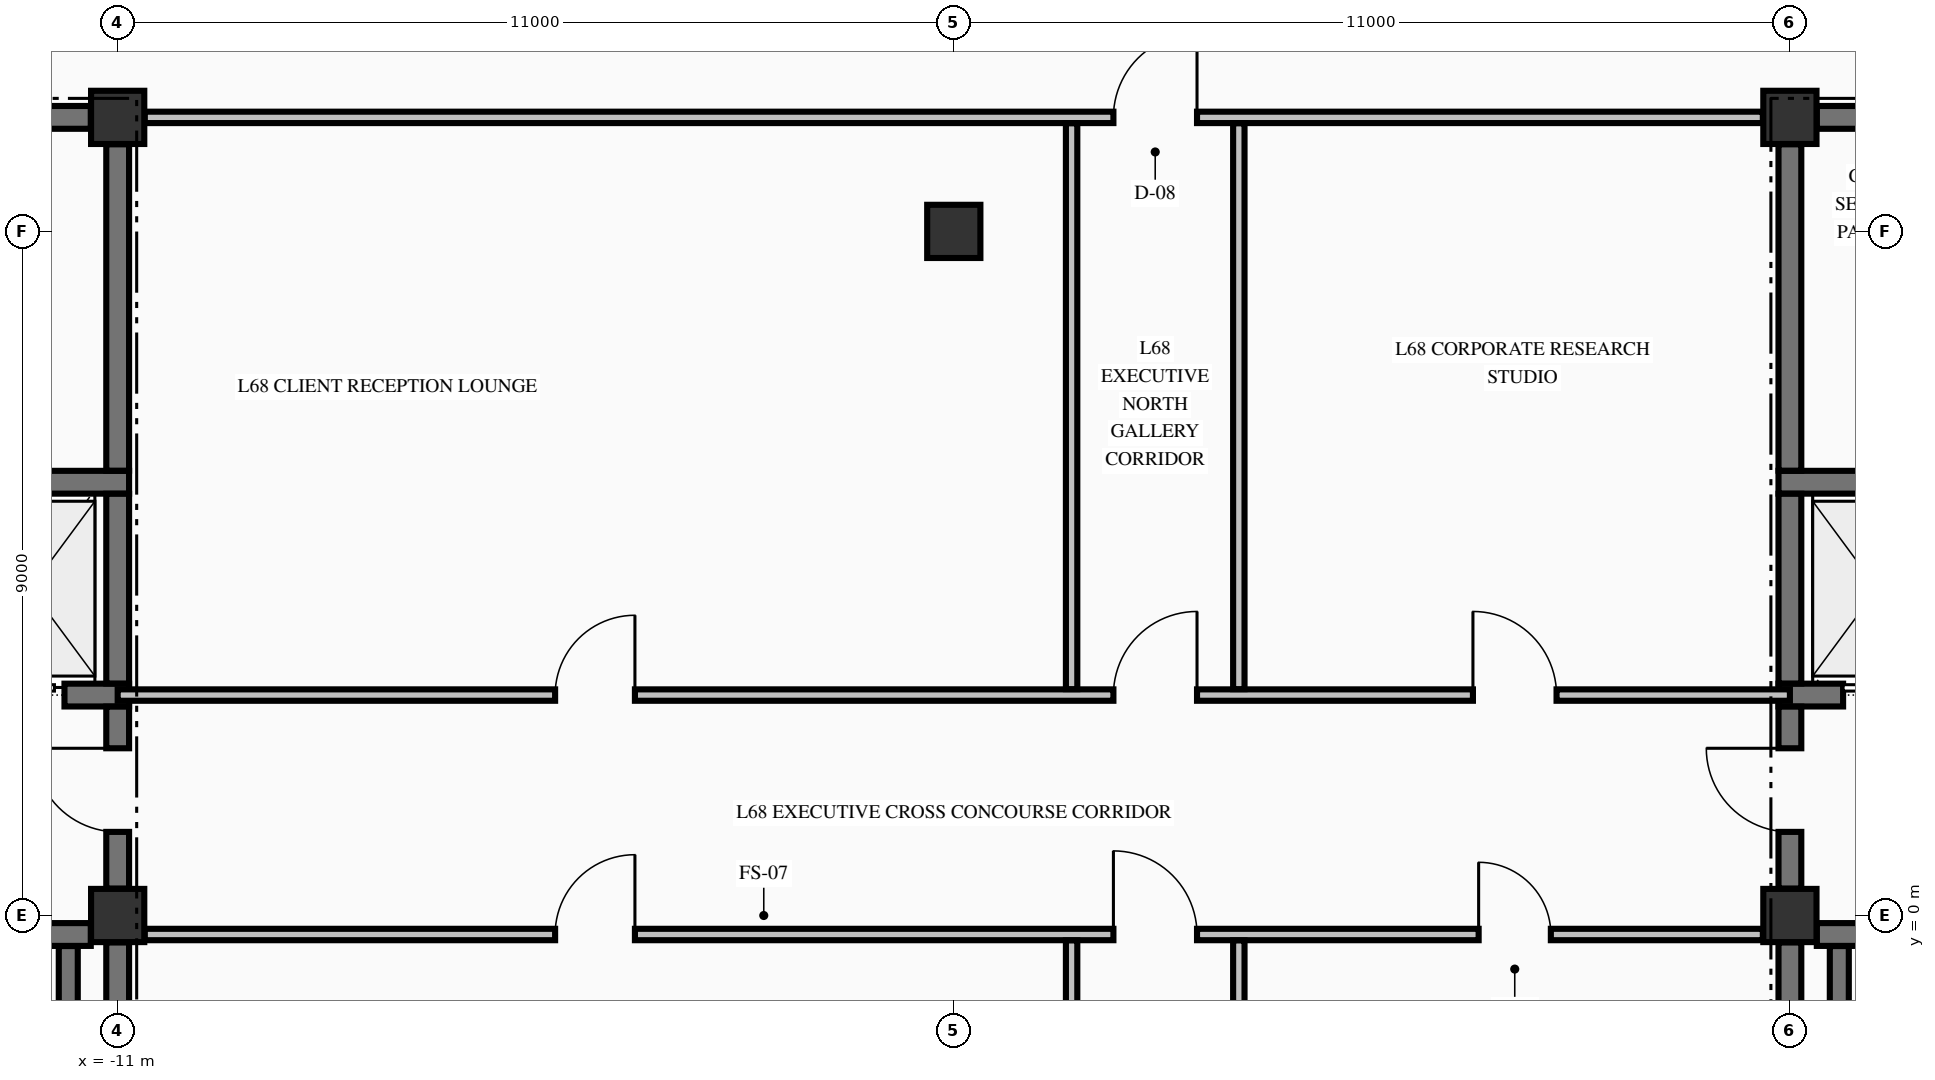
"""IFC4 building model, lengths in metres.
Left out: names, types, materials, properties, quantities, classifications, styles, units other than length and angle.
Written with IfcOpenShell. Run it as: python <this file> out.ifc"""

import sys

from ifc_helpers import new_model, si_unit, direction, frame, frame_2d, origin, origin_2d, place, context, subcontext, project, spatial, rectangle, extrude, element, fill, save


model = new_model("IFC4")
c1 = context("Model", 3, precision=1e-05, world=origin(), true_north=direction((0.0, 1.0)))
c2 = subcontext(c1, "Body", "Model", "MODEL_VIEW")
j1 = project(units=[si_unit("LENGTHUNIT", "METRE"), si_unit("PLANEANGLEUNIT", "RADIAN")], contexts=[c1])
p1 = place(None, origin())
s1 = spatial("IfcSite", under=j1, at=p1, CompositionType="ELEMENT")
p2 = place(p1, origin())
s2 = spatial("IfcBuilding", under=s1, at=p2, CompositionType="ELEMENT")
p3 = place(p2, frame((0.0, 0.0, 257.66)))
s3 = spatial("IfcBuildingStorey", under=s2, at=p3, CompositionType="ELEMENT", Elevation=257.66)
for number, where, z_axis, x_axis in (
    (1, (-11.0, 0.0, -0.25), (0.0, 0.0, 1.0), (1.0, 0.0, 0.0)),
    (2, (-11.0, 10.5, -0.25), (0.0, 0.0, 1.0), (1.0, 0.0, 0.0)),
    (3, (11.0, 0.0, -0.25), (0.0, 0.0, 1.0), (1.0, 0.0, 0.0)),
    (4, (11.0, 10.5, -0.25), (0.0, 0.0, 1.0), (1.0, 0.0, 0.0)),
    (5, (0.0, 9.0, -0.25), (0.0, 0.0, 1.0), (1.0, 0.0, 0.0)),
):
    element("IfcColumn", number, at=place(p3, frame(where, z_axis=z_axis, x_axis=x_axis)), inside=s3, PredefinedType="COLUMN", context=c2, shape_type="SweptSolid", body=[
        extrude(rectangle(XDim=0.7, YDim=0.7, at=origin_2d()), origin(), (0.0, 0.0, 1.0), 3.23),
    ])
p4 = place(p3, frame((-19.646, -0.25, 0.0), z_axis=(0.0, 0.0, 1.0), x_axis=(1.0, 0.0, 0.0)))
e6 = element("IfcWall", 6, at=p4, inside=s3, PredefinedType="SHEAR", context=c2, shape_type="SweptSolid", body=[
    extrude(rectangle(XDim=8.292, YDim=0.3, at=frame_2d((4.146, 0.0))), origin(), (0.0, 0.0, 1.0), 2.98),
])
p5 = place(p4, frame((5.946, 0.0, 0.0)))
e7 = element("IfcOpeningElement", 7, at=p5, cuts=e6, PredefinedType="OPENING", context=c2, shape_type="SweptSolid", body=[
    extrude(rectangle(XDim=1.1, YDim=2.15, at=frame_2d((0.55, 1.075))), frame((0.0, 0.16, 0.0), z_axis=(0.0, -1.0, 0.0), x_axis=(1.0, 0.0, 0.0)), (0.0, 0.0, 1.0), 0.32),
])
p6 = place(p3, frame((11.354, -0.25, 0.0), z_axis=(0.0, 0.0, 1.0), x_axis=(1.0, 0.0, 0.0)))
e8 = element("IfcWall", 8, at=p6, inside=s3, PredefinedType="SHEAR", context=c2, shape_type="SweptSolid", body=[
    extrude(rectangle(XDim=3.521, YDim=0.3, at=frame_2d((1.76, 0.0))), origin(), (0.0, 0.0, 1.0), 2.98),
])
p7 = place(p6, frame((1.246, 0.0, 0.0)))
e9 = element("IfcOpeningElement", 9, at=p7, cuts=e8, PredefinedType="OPENING", context=c2, shape_type="SweptSolid", body=[
    extrude(rectangle(XDim=1.1, YDim=2.15, at=frame_2d((0.55, 1.075))), frame((0.0, 0.16, 0.0), z_axis=(0.0, -1.0, 0.0), x_axis=(1.0, 0.0, 0.0)), (0.0, 0.0, 1.0), 0.32),
])
p8 = place(p3, frame((-14.875, 2.9, 0.0), z_axis=(0.0, 0.0, 1.0), x_axis=(1.0, 0.0, 0.0)))
e10 = element("IfcWall", 10, at=p8, inside=s3, PredefinedType="SHEAR", context=c2, shape_type="SweptSolid", body=[
    extrude(rectangle(XDim=4.025, YDim=0.3, at=frame_2d((2.012, 0.0))), origin(), (0.0, 0.0, 1.0), 2.98),
])
p9 = place(p8, frame((2.075, 0.0, 0.0)))
e11 = element("IfcOpeningElement", 11, at=p9, cuts=e10, PredefinedType="OPENING", context=c2, shape_type="SweptSolid", body=[
    extrude(rectangle(XDim=1.1, YDim=2.2, at=frame_2d((0.55, 1.1))), frame((0.0, 0.16, 0.0), z_axis=(0.0, -1.0, 0.0), x_axis=(1.0, 0.0, 0.0)), (0.0, 0.0, 1.0), 0.32),
])
p10 = place(p3, frame((10.85, 2.9, 0.0), z_axis=(0.0, 0.0, 1.0), x_axis=(1.0, 0.0, 0.0)))
e12 = element("IfcWall", 12, at=p10, inside=s3, PredefinedType="SHEAR", context=c2, shape_type="SweptSolid", body=[
    extrude(rectangle(XDim=4.025, YDim=0.3, at=frame_2d((2.012, 0.0))), origin(), (0.0, 0.0, 1.0), 2.98),
])
p11 = place(p10, frame((0.85, 0.0, 0.0)))
e13 = element("IfcOpeningElement", 13, at=p11, cuts=e12, PredefinedType="OPENING", context=c2, shape_type="SweptSolid", body=[
    extrude(rectangle(XDim=1.1, YDim=2.2, at=frame_2d((0.55, 1.1))), frame((0.0, 0.16, 0.0), z_axis=(0.0, -1.0, 0.0), x_axis=(1.0, 0.0, 0.0)), (0.0, 0.0, 1.0), 0.32),
])
for number, where, z_axis, x_axis in (
    (14, (-14.875, 5.7, 0.0), (0.0, 0.0, 1.0), (1.0, 0.0, 0.0)),
    (15, (10.85, 5.7, 0.0), (0.0, 0.0, 1.0), (1.0, 0.0, 0.0)),
):
    element("IfcWall", number, at=place(p3, frame(where, z_axis=z_axis, x_axis=x_axis)), inside=s3, PredefinedType="SHEAR", context=c2, shape_type="SweptSolid", body=[
        extrude(rectangle(XDim=4.025, YDim=0.3, at=frame_2d((2.012, 0.0))), origin(), (0.0, 0.0, 1.0), 2.98),
    ])
p12 = place(p3, frame((-14.7, 10.5, 0.0), z_axis=(0.0, 0.0, 1.0), x_axis=(1.0, 0.0, 0.0)))
e16 = element("IfcWall", 16, at=p12, inside=s3, PredefinedType="SHEAR", context=c2, shape_type="SweptSolid", body=[
    extrude(rectangle(XDim=3.346, YDim=0.3, at=frame_2d((1.673, 0.0))), origin(), (0.0, 0.0, 1.0), 2.98),
])
p13 = place(p12, frame((0.775, 0.0, 0.0)))
e17 = element("IfcOpeningElement", 17, at=p13, cuts=e16, PredefinedType="OPENING", context=c2, shape_type="SweptSolid", body=[
    extrude(rectangle(XDim=0.95, YDim=2.15, at=frame_2d((0.475, 1.075))), frame((0.0, 0.16, 0.0), z_axis=(0.0, -1.0, 0.0), x_axis=(1.0, 0.0, 0.0)), (0.0, 0.0, 1.0), 0.32),
])
p14 = place(p3, frame((11.354, 10.5, 0.0), z_axis=(0.0, 0.0, 1.0), x_axis=(1.0, 0.0, 0.0)))
e18 = element("IfcWall", 18, at=p14, inside=s3, PredefinedType="SHEAR", context=c2, shape_type="SweptSolid", body=[
    extrude(rectangle(XDim=3.346, YDim=0.3, at=frame_2d((1.673, 0.0))), origin(), (0.0, 0.0, 1.0), 2.98),
])
p15 = place(p14, frame((2.151, 0.0, 0.0)))
e19 = element("IfcOpeningElement", 19, at=p15, cuts=e18, PredefinedType="OPENING", context=c2, shape_type="SweptSolid", body=[
    extrude(rectangle(XDim=0.95, YDim=2.15, at=frame_2d((0.475, 1.075))), frame((0.0, 0.16, 0.0), z_axis=(0.0, -1.0, 0.0), x_axis=(1.0, 0.0, 0.0)), (0.0, 0.0, 1.0), 0.32),
])
p16 = place(p3, frame((-10.644, -0.25, 0.0), z_axis=(0.0, 0.0, 1.0), x_axis=(1.0, 0.0, 0.0)))
e20 = element("IfcWall", 20, at=p16, inside=s3, PredefinedType="PARTITIONING", context=c2, shape_type="SweptSolid", body=[
    extrude(rectangle(XDim=21.288, YDim=0.15, at=frame_2d((10.644, 0.0))), origin(), (0.0, 0.0, 1.0), 2.98),
])
p17 = place(p16, frame((12.744, 0.0, 0.0)))
e21 = element("IfcOpeningElement", 21, at=p17, cuts=e20, PredefinedType="OPENING", context=c2, shape_type="SweptSolid", body=[
    extrude(rectangle(XDim=1.1, YDim=2.15, at=frame_2d((0.55, 1.075))), frame((0.0, 0.085, 0.0), z_axis=(0.0, -1.0, 0.0), x_axis=(1.0, 0.0, 0.0)), (0.0, 0.0, 1.0), 0.17),
])
p18 = place(p16, frame((5.399, 0.0, 0.0)))
e22 = element("IfcOpeningElement", 22, at=p18, cuts=e20, PredefinedType="OPENING", context=c2, shape_type="SweptSolid", body=[
    extrude(rectangle(XDim=1.05, YDim=2.15, at=frame_2d((0.525, 1.075))), frame((0.0, 0.085, 0.0), z_axis=(0.0, -1.0, 0.0), x_axis=(1.0, 0.0, 0.0)), (0.0, 0.0, 1.0), 0.17),
])
p19 = place(p16, frame((17.549, 0.0, 0.0)))
e23 = element("IfcOpeningElement", 23, at=p19, cuts=e20, PredefinedType="OPENING", context=c2, shape_type="SweptSolid", body=[
    extrude(rectangle(XDim=0.95, YDim=2.15, at=frame_2d((0.475, 1.075))), frame((0.0, 0.085, 0.0), z_axis=(0.0, -1.0, 0.0), x_axis=(1.0, 0.0, 0.0)), (0.0, 0.0, 1.0), 0.17),
])
p20 = place(p3, frame((-11.0, 2.9, 0.0), z_axis=(0.0, 0.0, 1.0), x_axis=(1.0, 0.0, 0.0)))
e24 = element("IfcWall", 24, at=p20, inside=s3, PredefinedType="PARTITIONING", context=c2, shape_type="SweptSolid", body=[
    extrude(rectangle(XDim=22.0, YDim=0.15, at=frame_2d((11.0, 0.0))), origin(), (0.0, 0.0, 1.0), 2.98),
])
p21 = place(p20, frame((13.1, 0.0, 0.0)))
e25 = element("IfcOpeningElement", 25, at=p21, cuts=e24, PredefinedType="OPENING", context=c2, shape_type="SweptSolid", body=[
    extrude(rectangle(XDim=1.1, YDim=2.15, at=frame_2d((0.55, 1.075))), frame((0.0, 0.085, 0.0), z_axis=(0.0, -1.0, 0.0), x_axis=(1.0, 0.0, 0.0)), (0.0, 0.0, 1.0), 0.17),
])
p22 = place(p20, frame((5.755, 0.0, 0.0)))
e26 = element("IfcOpeningElement", 26, at=p22, cuts=e24, PredefinedType="OPENING", context=c2, shape_type="SweptSolid", body=[
    extrude(rectangle(XDim=1.05, YDim=2.15, at=frame_2d((0.525, 1.075))), frame((0.0, 0.085, 0.0), z_axis=(0.0, -1.0, 0.0), x_axis=(1.0, 0.0, 0.0)), (0.0, 0.0, 1.0), 0.17),
])
p23 = place(p20, frame((17.83, 0.0, 0.0)))
e27 = element("IfcOpeningElement", 27, at=p23, cuts=e24, PredefinedType="OPENING", context=c2, shape_type="SweptSolid", body=[
    extrude(rectangle(XDim=1.1, YDim=2.15, at=frame_2d((0.55, 1.075))), frame((0.0, 0.085, 0.0), z_axis=(0.0, -1.0, 0.0), x_axis=(1.0, 0.0, 0.0)), (0.0, 0.0, 1.0), 0.17),
])
p24 = place(p3, frame((-10.644, 10.5, 0.0), z_axis=(0.0, 0.0, 1.0), x_axis=(1.0, 0.0, 0.0)))
e28 = element("IfcWall", 28, at=p24, inside=s3, PredefinedType="PARTITIONING", context=c2, shape_type="SweptSolid", body=[
    extrude(rectangle(XDim=21.288, YDim=0.15, at=frame_2d((10.644, 0.0))), origin(), (0.0, 0.0, 1.0), 2.98),
])
p25 = place(p24, frame((12.744, 0.0, 0.0)))
e29 = element("IfcOpeningElement", 29, at=p25, cuts=e28, PredefinedType="OPENING", context=c2, shape_type="SweptSolid", body=[
    extrude(rectangle(XDim=1.1, YDim=2.15, at=frame_2d((0.55, 1.075))), frame((0.0, 0.085, 0.0), z_axis=(0.0, -1.0, 0.0), x_axis=(1.0, 0.0, 0.0)), (0.0, 0.0, 1.0), 0.17),
])
p26 = place(p3, frame((-11.65, -9.798, 0.0), z_axis=(0.0, 0.0, 1.0), x_axis=(0.0, 1.0, 0.0)))
e30 = element("IfcWall", 30, at=p26, inside=s3, PredefinedType="SOLIDWALL", context=c2, shape_type="SweptSolid", body=[
    extrude(rectangle(XDim=9.396, YDim=0.25, at=frame_2d((4.698, 0.0))), origin(), (0.0, 0.0, 1.0), 2.98),
])
p27 = place(p3, frame((-11.0, -9.596, 0.0), z_axis=(0.0, 0.0, 1.0), x_axis=(0.0, 1.0, 0.0)))
e31 = element("IfcWall", 31, at=p27, inside=s3, PredefinedType="SHEAR", context=c2, shape_type="SweptSolid", body=[
    extrude(rectangle(XDim=9.242, YDim=0.3, at=frame_2d((4.621, 0.0))), origin(), (0.0, 0.0, 1.0), 2.98),
])
p28 = place(p3, frame((-11.0, 0.354, 0.0), z_axis=(0.0, 0.0, 1.0), x_axis=(0.0, 1.0, 0.0)))
e32 = element("IfcWall", 32, at=p28, inside=s3, PredefinedType="SHEAR", context=c2, shape_type="SweptSolid", body=[
    extrude(rectangle(XDim=2.394, YDim=0.3, at=frame_2d((1.197, 0.0))), origin(), (0.0, 0.0, 1.0), 2.98),
])
p29 = place(p28, frame((0.746, 0.0, 0.0)))
e33 = element("IfcOpeningElement", 33, at=p29, cuts=e32, PredefinedType="OPENING", context=c2, shape_type="SweptSolid", body=[
    extrude(rectangle(XDim=1.1, YDim=2.15, at=frame_2d((0.55, 1.075))), frame((0.0, 0.16, 0.0), z_axis=(0.0, -1.0, 0.0), x_axis=(1.0, 0.0, 0.0)), (0.0, 0.0, 1.0), 0.32),
])
p30 = place(p3, frame((-11.0, 3.052, 0.0), z_axis=(0.0, 0.0, 1.0), x_axis=(0.0, 1.0, 0.0)))
e34 = element("IfcWall", 34, at=p30, inside=s3, PredefinedType="SHEAR", context=c2, shape_type="SweptSolid", body=[
    extrude(rectangle(XDim=2.496, YDim=0.3, at=frame_2d((1.248, 0.0))), origin(), (0.0, 0.0, 1.0), 2.98),
])
p31 = place(p3, frame((-11.0, 5.852, 0.0), z_axis=(0.0, 0.0, 1.0), x_axis=(0.0, 1.0, 0.0)))
e35 = element("IfcWall", 35, at=p31, inside=s3, PredefinedType="SHEAR", context=c2, shape_type="SweptSolid", body=[
    extrude(rectangle(XDim=4.294, YDim=0.3, at=frame_2d((2.147, 0.0))), origin(), (0.0, 0.0, 1.0), 2.98),
])
p32 = place(p3, frame((11.0, -9.596, 0.0), z_axis=(0.0, 0.0, 1.0), x_axis=(0.0, 1.0, 0.0)))
e36 = element("IfcWall", 36, at=p32, inside=s3, PredefinedType="SHEAR", context=c2, shape_type="SweptSolid", body=[
    extrude(rectangle(XDim=9.242, YDim=0.3, at=frame_2d((4.621, 0.0))), origin(), (0.0, 0.0, 1.0), 2.98),
])
p33 = place(p3, frame((11.0, 0.354, 0.0), z_axis=(0.0, 0.0, 1.0), x_axis=(0.0, 1.0, 0.0)))
e37 = element("IfcWall", 37, at=p33, inside=s3, PredefinedType="SHEAR", context=c2, shape_type="SweptSolid", body=[
    extrude(rectangle(XDim=2.394, YDim=0.3, at=frame_2d((1.197, 0.0))), origin(), (0.0, 0.0, 1.0), 2.98),
])
p34 = place(p33, frame((0.746, 0.0, 0.0)))
e38 = element("IfcOpeningElement", 38, at=p34, cuts=e37, PredefinedType="OPENING", context=c2, shape_type="SweptSolid", body=[
    extrude(rectangle(XDim=1.1, YDim=2.15, at=frame_2d((0.55, 1.075))), frame((0.0, 0.16, 0.0), z_axis=(0.0, -1.0, 0.0), x_axis=(1.0, 0.0, 0.0)), (0.0, 0.0, 1.0), 0.32),
])
p35 = place(p3, frame((11.0, 3.052, 0.0), z_axis=(0.0, 0.0, 1.0), x_axis=(0.0, 1.0, 0.0)))
e39 = element("IfcWall", 39, at=p35, inside=s3, PredefinedType="SHEAR", context=c2, shape_type="SweptSolid", body=[
    extrude(rectangle(XDim=2.496, YDim=0.3, at=frame_2d((1.248, 0.0))), origin(), (0.0, 0.0, 1.0), 2.98),
])
p36 = place(p3, frame((11.0, 5.852, 0.0), z_axis=(0.0, 0.0, 1.0), x_axis=(0.0, 1.0, 0.0)))
e40 = element("IfcWall", 40, at=p36, inside=s3, PredefinedType="SHEAR", context=c2, shape_type="SweptSolid", body=[
    extrude(rectangle(XDim=4.294, YDim=0.3, at=frame_2d((2.147, 0.0))), origin(), (0.0, 0.0, 1.0), 2.98),
])
p37 = place(p3, frame((11.65, -9.798, 0.0), z_axis=(0.0, 0.0, 1.0), x_axis=(0.0, 1.0, 0.0)))
e41 = element("IfcWall", 41, at=p37, inside=s3, PredefinedType="SOLIDWALL", context=c2, shape_type="SweptSolid", body=[
    extrude(rectangle(XDim=9.396, YDim=0.25, at=frame_2d((4.698, 0.0))), origin(), (0.0, 0.0, 1.0), 2.98),
])
p38 = place(p3, frame((1.55, -9.872, 0.0), z_axis=(0.0, 0.0, 1.0), x_axis=(0.0, 1.0, 0.0)))
e42 = element("IfcWall", 42, at=p38, inside=s3, PredefinedType="PARTITIONING", context=c2, shape_type="SweptSolid", body=[
    extrude(rectangle(XDim=9.544, YDim=0.15, at=frame_2d((4.772, 0.0))), origin(), (0.0, 0.0, 1.0), 2.98),
])
p39 = place(p3, frame((1.55, 2.978, 0.0), z_axis=(0.0, 0.0, 1.0), x_axis=(0.0, 1.0, 0.0)))
e43 = element("IfcWall", 43, at=p39, inside=s3, PredefinedType="PARTITIONING", context=c2, shape_type="SweptSolid", body=[
    extrude(rectangle(XDim=7.444, YDim=0.15, at=frame_2d((3.722, 0.0))), origin(), (0.0, 0.0, 1.0), 2.98),
])
p40 = place(p3, frame((3.75, -4.147, 0.0), z_axis=(0.0, 0.0, 1.0), x_axis=(0.0, 1.0, 0.0)))
e44 = element("IfcWall", 44, at=p40, inside=s3, PredefinedType="PARTITIONING", context=c2, shape_type="SweptSolid", body=[
    extrude(rectangle(XDim=3.819, YDim=0.15, at=frame_2d((1.91, 0.0))), origin(), (0.0, 0.0, 1.0), 2.98),
])
p41 = place(p3, frame((3.75, 2.978, 0.0), z_axis=(0.0, 0.0, 1.0), x_axis=(0.0, 1.0, 0.0)))
e45 = element("IfcWall", 45, at=p41, inside=s3, PredefinedType="PARTITIONING", context=c2, shape_type="SweptSolid", body=[
    extrude(rectangle(XDim=7.444, YDim=0.15, at=frame_2d((3.722, 0.0))), origin(), (0.0, 0.0, 1.0), 2.98),
])
p42 = place(p29, origin())
e46 = element("IfcDoor", 46, at=p42, inside=s3, OperationType="SINGLE_SWING_RIGHT", PredefinedType="DOOR", context=c2, shape_type="SweptSolid", body=[
    extrude(rectangle(XDim=1.1, YDim=2.15, at=frame_2d((0.55, 1.075))), frame((0.0, 0.025, 0.0), z_axis=(0.0, -1.0, 0.0), x_axis=(1.0, 0.0, 0.0)), (0.0, 0.0, 1.0), 0.05),
])
fill(e33, e46)
p43 = place(p9, origin())
e47 = element("IfcDoor", 47, at=p43, inside=s3, OperationType="SLIDING_TO_LEFT", PredefinedType="DOOR", context=c2, shape_type="SweptSolid", body=[
    extrude(rectangle(XDim=1.1, YDim=2.2, at=frame_2d((0.55, 1.1))), frame((0.0, 0.025, 0.0), z_axis=(0.0, -1.0, 0.0), x_axis=(1.0, 0.0, 0.0)), (0.0, 0.0, 1.0), 0.05),
])
fill(e11, e47)
p44 = place(p34, origin())
e48 = element("IfcDoor", 48, at=p44, inside=s3, OperationType="SINGLE_SWING_RIGHT", PredefinedType="DOOR", context=c2, shape_type="SweptSolid", body=[
    extrude(rectangle(XDim=1.1, YDim=2.15, at=frame_2d((0.55, 1.075))), frame((0.0, 0.025, 0.0), z_axis=(0.0, -1.0, 0.0), x_axis=(1.0, 0.0, 0.0)), (0.0, 0.0, 1.0), 0.05),
])
fill(e38, e48)
p45 = place(p11, origin())
e49 = element("IfcDoor", 49, at=p45, inside=s3, OperationType="SLIDING_TO_RIGHT", PredefinedType="DOOR", context=c2, shape_type="SweptSolid", body=[
    extrude(rectangle(XDim=1.1, YDim=2.2, at=frame_2d((0.55, 1.1))), frame((0.0, 0.025, 0.0), z_axis=(0.0, -1.0, 0.0), x_axis=(1.0, 0.0, 0.0)), (0.0, 0.0, 1.0), 0.05),
])
fill(e13, e49)
p46 = place(p25, origin())
e50 = element("IfcDoor", 50, at=p46, inside=s3, OperationType="SINGLE_SWING_RIGHT", PredefinedType="DOOR", context=c2, shape_type="SweptSolid", body=[
    extrude(rectangle(XDim=1.1, YDim=2.15, at=frame_2d((0.55, 1.075))), frame((0.0, 0.025, 0.0), z_axis=(0.0, -1.0, 0.0), x_axis=(1.0, 0.0, 0.0)), (0.0, 0.0, 1.0), 0.05),
])
fill(e29, e50)
p47 = place(p21, origin())
e51 = element("IfcDoor", 51, at=p47, inside=s3, OperationType="SINGLE_SWING_RIGHT", PredefinedType="DOOR", context=c2, shape_type="SweptSolid", body=[
    extrude(rectangle(XDim=1.1, YDim=2.15, at=frame_2d((0.55, 1.075))), frame((0.0, 0.025, 0.0), z_axis=(0.0, -1.0, 0.0), x_axis=(1.0, 0.0, 0.0)), (0.0, 0.0, 1.0), 0.05),
])
fill(e25, e51)
p48 = place(p17, origin())
e52 = element("IfcDoor", 52, at=p48, inside=s3, OperationType="SINGLE_SWING_LEFT", PredefinedType="DOOR", context=c2, shape_type="SweptSolid", body=[
    extrude(rectangle(XDim=1.1, YDim=2.15, at=frame_2d((0.55, 1.075))), frame((0.0, 0.025, 0.0), z_axis=(0.0, -1.0, 0.0), x_axis=(1.0, 0.0, 0.0)), (0.0, 0.0, 1.0), 0.05),
])
fill(e21, e52)
p49 = place(p22, origin())
e53 = element("IfcDoor", 53, at=p49, inside=s3, OperationType="SINGLE_SWING_RIGHT", PredefinedType="DOOR", context=c2, shape_type="SweptSolid", body=[
    extrude(rectangle(XDim=1.05, YDim=2.15, at=frame_2d((0.525, 1.075))), frame((0.0, 0.025, 0.0), z_axis=(0.0, -1.0, 0.0), x_axis=(1.0, 0.0, 0.0)), (0.0, 0.0, 1.0), 0.05),
])
fill(e26, e53)
p50 = place(p23, origin())
e54 = element("IfcDoor", 54, at=p50, inside=s3, OperationType="SINGLE_SWING_LEFT", PredefinedType="DOOR", context=c2, shape_type="SweptSolid", body=[
    extrude(rectangle(XDim=1.1, YDim=2.15, at=frame_2d((0.55, 1.075))), frame((0.0, 0.025, 0.0), z_axis=(0.0, -1.0, 0.0), x_axis=(1.0, 0.0, 0.0)), (0.0, 0.0, 1.0), 0.05),
])
fill(e27, e54)
p51 = place(p18, origin())
e55 = element("IfcDoor", 55, at=p51, inside=s3, OperationType="SINGLE_SWING_RIGHT", PredefinedType="DOOR", context=c2, shape_type="SweptSolid", body=[
    extrude(rectangle(XDim=1.05, YDim=2.15, at=frame_2d((0.525, 1.075))), frame((0.0, 0.025, 0.0), z_axis=(0.0, -1.0, 0.0), x_axis=(1.0, 0.0, 0.0)), (0.0, 0.0, 1.0), 0.05),
])
fill(e22, e55)
p52 = place(p19, origin())
e56 = element("IfcDoor", 56, at=p52, inside=s3, OperationType="SINGLE_SWING_LEFT", PredefinedType="DOOR", context=c2, shape_type="SweptSolid", body=[
    extrude(rectangle(XDim=0.95, YDim=2.15, at=frame_2d((0.475, 1.075))), frame((0.0, 0.025, 0.0), z_axis=(0.0, -1.0, 0.0), x_axis=(1.0, 0.0, 0.0)), (0.0, 0.0, 1.0), 0.05),
])
fill(e23, e56)
save(model, sys.argv[1])
